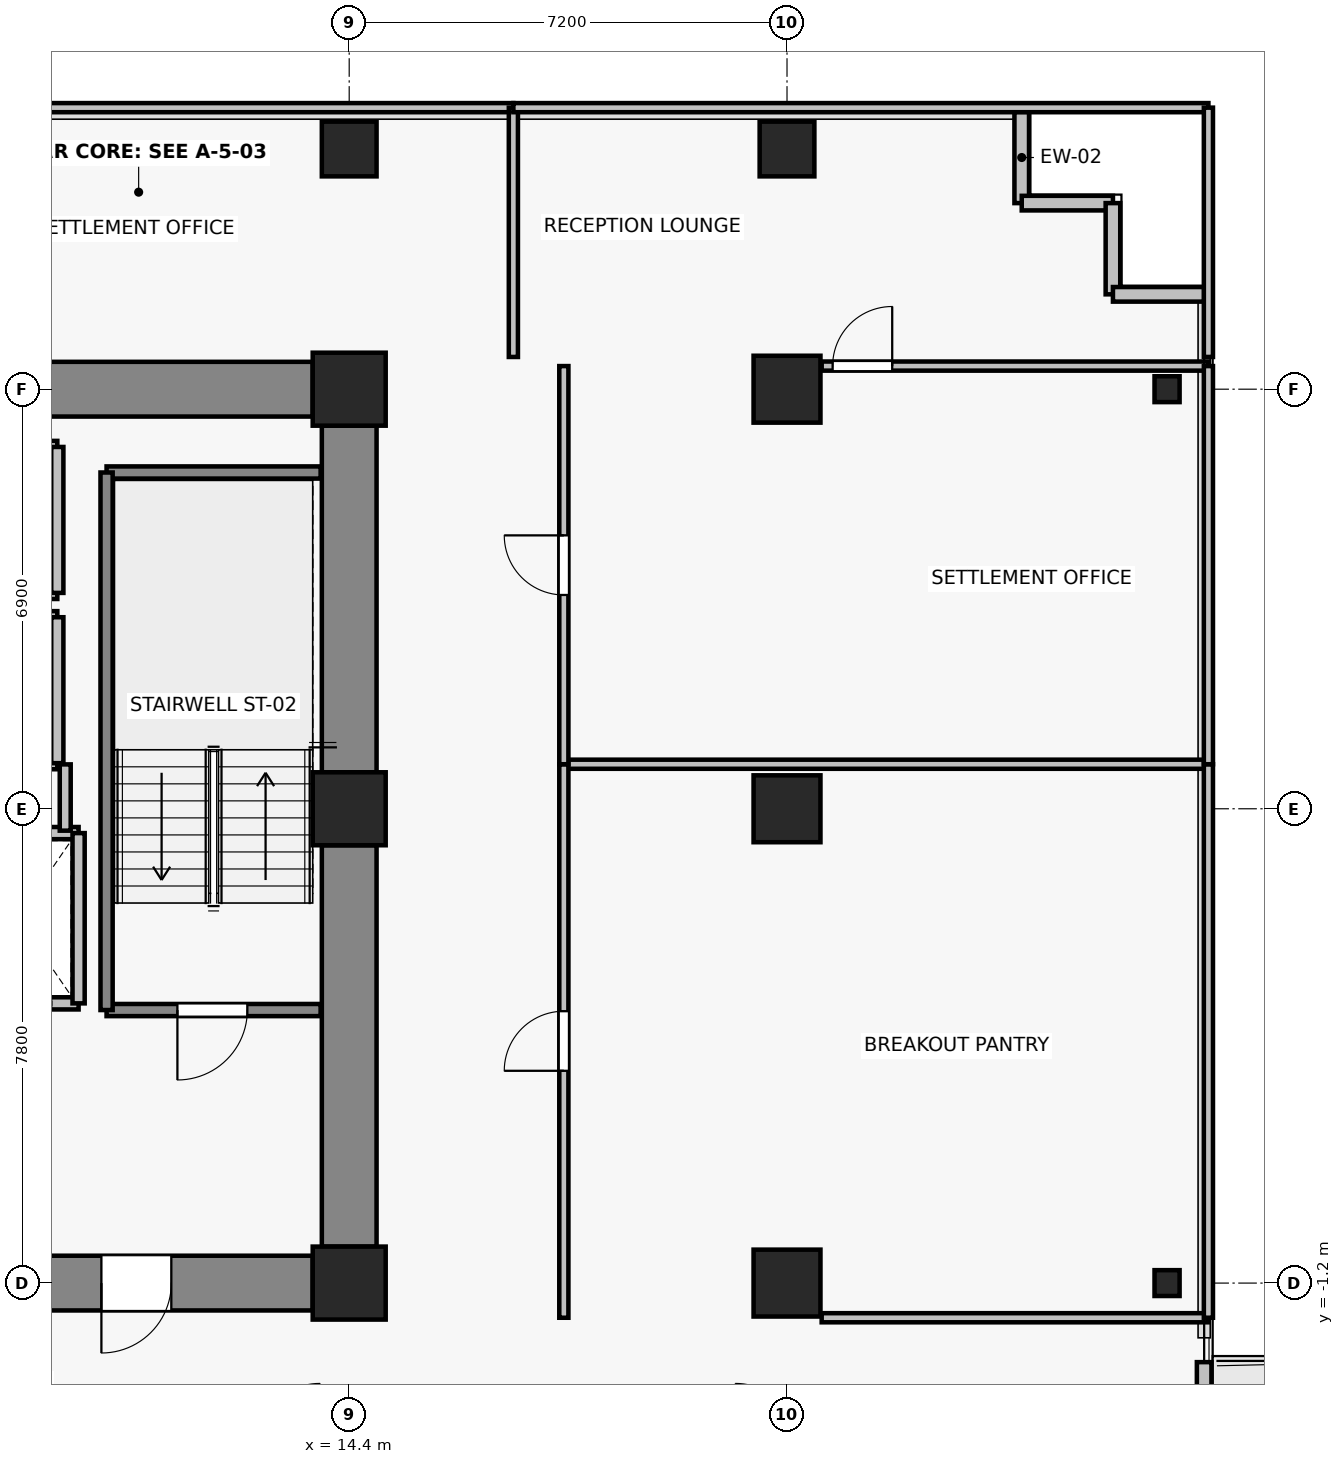
"""IFC4 building model, lengths in metres.
Left out: names, types, materials, properties, quantities, classifications, styles, units other than length and angle.
Written with IfcOpenShell. Run it as: python <this file> out.ifc"""

import sys

from ifc_helpers import new_model, si_unit, direction, frame, frame_2d, origin, origin_2d, place, context, subcontext, project, spatial, rectangle, i_section, extrude, source, transform, mapped, element, fill, save


model = new_model("IFC4")
c1 = context("Model", 3, precision=1e-05, world=origin(), true_north=direction((0.0, 1.0)))
c2 = subcontext(c1, "Body", "Model", "MODEL_VIEW")
j1 = project(units=[si_unit("LENGTHUNIT", "METRE"), si_unit("PLANEANGLEUNIT", "RADIAN")], contexts=[c1])
p1 = place(None, origin())
s1 = spatial("IfcSite", under=j1, at=p1, CompositionType="ELEMENT")
p2 = place(p1, origin())
s2 = spatial("IfcBuilding", under=s1, at=p2, CompositionType="ELEMENT")
p3 = place(p2, frame((0.0, 0.0, 37.3)))
s3 = spatial("IfcBuildingStorey", under=s2, at=p3, CompositionType="ELEMENT", Elevation=37.3)
for number, where, z_axis, x_axis in (
    (1, (14.4, -1.2, 0.0), (0.0, 0.0, 1.0), (1.0, 0.0, 0.0)),
    (2, (14.4, 6.6, 0.0), (0.0, 0.0, 1.0), (1.0, 0.0, 0.0)),
    (3, (14.4, 13.5, 0.0), (0.0, 0.0, 1.0), (1.0, 0.0, 0.0)),
):
    element("IfcColumn", number, at=place(p3, frame(where, z_axis=z_axis, x_axis=x_axis)), inside=s3, PredefinedType="COLUMN", context=c2, shape_type="SweptSolid", body=[
        extrude(rectangle(XDim=1.2, YDim=1.2, at=origin_2d()), origin(), (0.0, 0.0, 1.0), 3.3),
    ])
for number, where, z_axis, x_axis in (
    (4, (21.6, -1.2, 0.0), (0.0, 0.0, 1.0), (1.0, 0.0, 0.0)),
    (5, (21.6, 6.6, 0.0), (0.0, 0.0, 1.0), (1.0, 0.0, 0.0)),
    (6, (21.6, 13.5, 0.0), (0.0, 0.0, 1.0), (1.0, 0.0, 0.0)),
):
    element("IfcColumn", number, at=place(p3, frame(where, z_axis=z_axis, x_axis=x_axis)), inside=s3, PredefinedType="COLUMN", context=c2, shape_type="SweptSolid", body=[
        extrude(rectangle(XDim=1.1, YDim=1.1, at=origin_2d()), origin(), (0.0, 0.0, 1.0), 3.3),
    ])
for number, where, z_axis, x_axis in (
    (7, (14.4, 17.45, 0.0), (0.0, 0.0, 1.0), (1.0, 0.0, 0.0)),
    (8, (21.6, 17.45, 0.0), (0.0, 0.0, 1.0), (1.0, 0.0, 0.0)),
):
    element("IfcColumn", number, at=place(p3, frame(where, z_axis=z_axis, x_axis=x_axis)), inside=s3, PredefinedType="COLUMN", context=c2, shape_type="SweptSolid", body=[
        extrude(rectangle(XDim=0.9, YDim=0.9, at=origin_2d()), origin(), (0.0, 0.0, 1.0), 3.3),
    ])
for number, where, z_axis, x_axis in (
    (9, (27.85, -1.2, 0.0), (0.0, 0.0, 1.0), (1.0, 0.0, 0.0)),
    (10, (27.85, 13.5, 0.0), (0.0, 0.0, 1.0), (1.0, 0.0, 0.0)),
):
    element("IfcColumn", number, at=place(p3, frame(where, z_axis=z_axis, x_axis=x_axis)), inside=s3, PredefinedType="COLUMN", context=c2, shape_type="SweptSolid", body=[
        extrude(i_section(OverallWidth=0.412, OverallDepth=0.425, WebThickness=0.026, FlangeThickness=0.039, FilletRadius=0.015, at=origin_2d()), origin(), (0.0, 0.0, 1.0), 3.3),
    ])
p4 = place(p3, frame((7.8, 13.5, 0.0), z_axis=(0.0, 0.0, 1.0), x_axis=(1.0, 0.0, 0.0)))
e11 = element("IfcWall", 11, at=p4, inside=s3, PredefinedType="SHEAR", context=c2, shape_type="SweptSolid", body=[
    extrude(rectangle(XDim=6.0, YDim=0.9, at=frame_2d((3.0, 0.0))), origin(), (0.0, 0.0, 1.0), 3.075),
])
p5 = place(p3, frame((14.4, -0.6, 0.0), z_axis=(0.0, 0.0, 1.0), x_axis=(0.0, 1.0, 0.0)))
e12 = element("IfcWall", 12, at=p5, inside=s3, PredefinedType="SHEAR", context=c2, shape_type="SweptSolid", body=[
    extrude(rectangle(XDim=6.6, YDim=0.9, at=frame_2d((3.3, 0.0))), origin(), (0.0, 0.0, 1.0), 3.075),
])
p6 = place(p3, frame((14.4, 7.2, 0.0), z_axis=(0.0, 0.0, 1.0), x_axis=(0.0, 1.0, 0.0)))
e13 = element("IfcWall", 13, at=p6, inside=s3, PredefinedType="SHEAR", context=c2, shape_type="SweptSolid", body=[
    extrude(rectangle(XDim=5.7, YDim=0.9, at=frame_2d((2.85, 0.0))), origin(), (0.0, 0.0, 1.0), 3.075),
])
p7 = place(p3, frame((13.8, -1.2, 0.0), z_axis=(0.0, 0.0, 1.0), x_axis=(-1.0, 0.0, 0.0)))
e14 = element("IfcWall", 14, at=p7, inside=s3, PredefinedType="SHEAR", context=c2, shape_type="SweptSolid", body=[
    extrude(rectangle(XDim=6.0, YDim=0.9, at=frame_2d((3.0, 0.0))), origin(), (0.0, 0.0, 1.0), 3.075),
])
p8 = place(p7, frame((2.325, 0.0, 0.0)))
e15 = element("IfcOpeningElement", 15, at=p8, cuts=e14, PredefinedType="OPENING", context=c2, shape_type="SweptSolid", body=[
    extrude(rectangle(XDim=1.15, YDim=2.15, at=frame_2d((0.575, 1.075))), frame((0.0, 0.46, 0.0), z_axis=(0.0, -1.0, 0.0), x_axis=(1.0, 0.0, 0.0)), (0.0, 0.0, 1.0), 0.92),
])
p9 = place(p3, frame((28.46, -2.5, 0.0), z_axis=(0.0, 0.0, 1.0), x_axis=(0.0, -1.0, 0.0)))
e16 = element("IfcWall", 16, at=p9, inside=s3, PredefinedType="SOLIDWALL", context=c2, shape_type="SweptSolid", body=[
    extrude(rectangle(XDim=5.8, YDim=0.24, at=frame_2d((2.9, 0.0))), origin(), (0.0, 0.0, 1.0), 3.075),
])
p10 = place(p9, frame((1.566, 0.0, 0.0)))
e17 = element("IfcOpeningElement", 17, at=p10, cuts=e16, PredefinedType="OPENING", context=c2, shape_type="SweptSolid", body=[
    extrude(rectangle(XDim=1.0, YDim=2.2, at=frame_2d((0.5, 1.1))), frame((0.0, 0.13, 0.0), z_axis=(0.0, -1.0, 0.0), x_axis=(1.0, 0.0, 0.0)), (0.0, 0.0, 1.0), 0.26),
])
p11 = place(p9, frame((2.916, 0.0, 0.85)))
e18 = element("IfcOpeningElement", 18, at=p11, cuts=e16, PredefinedType="OPENING", context=c2, shape_type="SweptSolid", body=[
    extrude(rectangle(XDim=1.5, YDim=1.6, at=frame_2d((0.75, 0.8))), frame((0.0, 0.13, 0.0), z_axis=(0.0, -1.0, 0.0), x_axis=(1.0, 0.0, 0.0)), (0.0, 0.0, 1.0), 0.26),
])
for number, where, z_axis, x_axis in (
    (19, (25.46, 16.56, 0.0), (0.0, 0.0, 1.0), (0.0, 1.0, 0.0)),
    (20, (26.96, 16.56, 0.0), (0.0, 0.0, 1.0), (-1.0, 0.0, 0.0)),
    (21, (26.96, 15.06, 0.0), (0.0, 0.0, 1.0), (0.0, 1.0, 0.0)),
    (22, (28.46, 15.06, 0.0), (0.0, 0.0, 1.0), (-1.0, 0.0, 0.0)),
):
    element("IfcWall", number, at=place(p3, frame(where, z_axis=z_axis, x_axis=x_axis)), inside=s3, PredefinedType="SOLIDWALL", context=c2, shape_type="SweptSolid", body=[
        extrude(rectangle(XDim=1.5, YDim=0.24, at=frame_2d((0.75, 0.0))), origin(), (0.0, 0.0, 1.0), 3.075),
    ])
p12 = place(p3, frame((9.95, 3.4, 0.0), z_axis=(0.0, 0.0, 1.0), x_axis=(-1.0, 0.0, 0.0)))
e23 = element("IfcWall", 23, at=p12, inside=s3, PredefinedType="SOLIDWALL", context=c2, shape_type="SweptSolid", body=[
    extrude(rectangle(XDim=2.0, YDim=0.2, at=frame_2d((1.0, 0.0))), origin(), (0.0, 0.0, 1.0), 3.075),
])
p13 = place(p12, frame((0.45, 0.0, 0.0)))
e24 = element("IfcOpeningElement", 24, at=p13, cuts=e23, PredefinedType="OPENING", context=c2, shape_type="SweptSolid", body=[
    extrude(rectangle(XDim=1.1, YDim=2.2, at=frame_2d((0.55, 1.1))), frame((0.0, 0.11, 0.0), z_axis=(0.0, -1.0, 0.0), x_axis=(1.0, 0.0, 0.0)), (0.0, 0.0, 1.0), 0.22),
])
p14 = place(p3, frame((7.95, 6.2, 0.0), z_axis=(0.0, 0.0, 1.0), x_axis=(1.0, 0.0, 0.0)))
e25 = element("IfcWall", 25, at=p14, inside=s3, PredefinedType="SOLIDWALL", context=c2, shape_type="SweptSolid", body=[
    extrude(rectangle(XDim=2.0, YDim=0.2, at=frame_2d((1.0, 0.0))), origin(), (0.0, 0.0, 1.0), 3.075),
])
p15 = place(p3, frame((9.95, 6.2, 0.0), z_axis=(0.0, 0.0, 1.0), x_axis=(0.0, -1.0, 0.0)))
e26 = element("IfcWall", 26, at=p15, inside=s3, PredefinedType="SOLIDWALL", context=c2, shape_type="SweptSolid", body=[
    extrude(rectangle(XDim=2.8, YDim=0.2, at=frame_2d((1.4, 0.0))), origin(), (0.0, 0.0, 1.0), 3.075),
])
for number, where, z_axis, x_axis in (
    (27, (9.6, 7.35, 0.0), (0.0, 0.0, 1.0), (-1.0, 0.0, 0.0)),
    (28, (7.4, 9.75, 0.0), (0.0, 0.0, 1.0), (1.0, 0.0, 0.0)),
):
    element("IfcWall", number, at=place(p3, frame(where, z_axis=z_axis, x_axis=x_axis)), inside=s3, PredefinedType="SOLIDWALL", context=c2, shape_type="SweptSolid", body=[
        extrude(rectangle(XDim=2.2, YDim=0.2, at=frame_2d((1.1, 0.0))), origin(), (0.0, 0.0, 1.0), 2.465),
    ])
p16 = place(p3, frame((9.6, 9.75, 0.0), z_axis=(0.0, 0.0, 1.0), x_axis=(0.0, -1.0, 0.0)))
e29 = element("IfcWall", 29, at=p16, inside=s3, PredefinedType="SOLIDWALL", context=c2, shape_type="SweptSolid", body=[
    extrude(rectangle(XDim=2.4, YDim=0.2, at=frame_2d((1.2, 0.0))), origin(), (0.0, 0.0, 1.0), 3.075),
])
for number, where, z_axis, x_axis in (
    (30, (9.6, 10.15, 0.0), (0.0, 0.0, 1.0), (-1.0, 0.0, 0.0)),
    (31, (7.4, 12.55, 0.0), (0.0, 0.0, 1.0), (1.0, 0.0, 0.0)),
):
    element("IfcWall", number, at=place(p3, frame(where, z_axis=z_axis, x_axis=x_axis)), inside=s3, PredefinedType="SOLIDWALL", context=c2, shape_type="SweptSolid", body=[
        extrude(rectangle(XDim=2.2, YDim=0.2, at=frame_2d((1.1, 0.0))), origin(), (0.0, 0.0, 1.0), 2.465),
    ])
p17 = place(p3, frame((9.6, 12.55, 0.0), z_axis=(0.0, 0.0, 1.0), x_axis=(0.0, -1.0, 0.0)))
e32 = element("IfcWall", 32, at=p17, inside=s3, PredefinedType="SOLIDWALL", context=c2, shape_type="SweptSolid", body=[
    extrude(rectangle(XDim=2.4, YDim=0.2, at=frame_2d((1.2, 0.0))), origin(), (0.0, 0.0, 1.0), 3.075),
])
p18 = place(p3, frame((13.93, 3.29, 0.0), z_axis=(0.0, 0.0, 1.0), x_axis=(-1.0, 0.0, 0.0)))
e33 = element("IfcWall", 33, at=p18, inside=s3, PredefinedType="SOLIDWALL", context=c2, shape_type="SweptSolid", body=[
    extrude(rectangle(XDim=3.52, YDim=0.2, at=frame_2d((1.76, 0.0))), origin(), (0.0, 0.0, 1.0), 3.075),
])
p19 = place(p18, frame((1.205, 0.0, 0.0)))
e34 = element("IfcOpeningElement", 34, at=p19, cuts=e33, PredefinedType="OPENING", context=c2, shape_type="SweptSolid", body=[
    extrude(rectangle(XDim=1.15, YDim=2.15, at=frame_2d((0.575, 1.075))), frame((0.0, 0.11, 0.0), z_axis=(0.0, -1.0, 0.0), x_axis=(1.0, 0.0, 0.0)), (0.0, 0.0, 1.0), 0.22),
])
p20 = place(p3, frame((10.41, 12.13, 0.0), z_axis=(0.0, 0.0, 1.0), x_axis=(1.0, 0.0, 0.0)))
e35 = element("IfcWall", 35, at=p20, inside=s3, PredefinedType="SOLIDWALL", context=c2, shape_type="SweptSolid", body=[
    extrude(rectangle(XDim=3.52, YDim=0.2, at=frame_2d((1.76, 0.0))), origin(), (0.0, 0.0, 1.0), 3.075),
])
p21 = place(p3, frame((10.41, 3.29, 0.0), z_axis=(0.0, 0.0, 1.0), x_axis=(0.0, 1.0, 0.0)))
e36 = element("IfcWall", 36, at=p21, inside=s3, PredefinedType="SOLIDWALL", context=c2, shape_type="SweptSolid", body=[
    extrude(rectangle(XDim=8.84, YDim=0.2, at=frame_2d((4.42, 0.0))), origin(), (0.0, 0.0, 1.0), 3.075),
])
p22 = place(p3, frame((9.73, 7.33, 0.0), z_axis=(0.0, 0.0, 1.0), x_axis=(0.0, -1.0, 0.0)))
e37 = element("IfcWall", 37, at=p22, inside=s3, PredefinedType="PARTITIONING", context=c2, shape_type="SweptSolid", body=[
    extrude(rectangle(XDim=1.09, YDim=0.18, at=frame_2d((0.545, 0.0))), origin(), (0.0, 0.0, 1.0), 3.075),
])
p23 = place(p3, frame((28.53, -1.77, 0.0), z_axis=(0.0, 0.0, 1.0), x_axis=(-1.0, 0.0, 0.0)))
e38 = element("IfcWall", 38, at=p23, inside=s3, PredefinedType="PARTITIONING", context=c2, shape_type="SweptSolid", body=[
    extrude(rectangle(XDim=6.36, YDim=0.15, at=frame_2d((3.18, 0.0))), origin(), (0.0, 0.0, 1.0), 2.465),
])
p24 = place(p3, frame((17.93, 7.333, 0.0), z_axis=(0.0, 0.0, 1.0), x_axis=(1.0, 0.0, 0.0)))
e39 = element("IfcWall", 39, at=p24, inside=s3, PredefinedType="PARTITIONING", context=c2, shape_type="SweptSolid", body=[
    extrude(rectangle(XDim=10.6, YDim=0.15, at=frame_2d((5.3, 0.0))), origin(), (0.0, 0.0, 1.0), 2.465),
])
p25 = place(p3, frame((17.93, -1.77, 0.0), z_axis=(0.0, 0.0, 1.0), x_axis=(0.0, 1.0, 0.0)))
e40 = element("IfcWall", 40, at=p25, inside=s3, PredefinedType="PARTITIONING", context=c2, shape_type="SweptSolid", body=[
    extrude(rectangle(XDim=9.103, YDim=0.15, at=frame_2d((4.551, 0.0))), origin(), (0.0, 0.0, 1.0), 2.465),
])
p26 = place(p25, frame((4.061, 0.0, 0.0)))
e41 = element("IfcOpeningElement", 41, at=p26, cuts=e40, PredefinedType="OPENING", context=c2, shape_type="SweptSolid", body=[
    extrude(rectangle(XDim=0.98, YDim=2.15, at=frame_2d((0.49, 1.075))), frame((0.0, 0.085, 0.0), z_axis=(0.0, -1.0, 0.0), x_axis=(1.0, 0.0, 0.0)), (0.0, 0.0, 1.0), 0.17),
])
p27 = place(p3, frame((28.53, 7.333, 0.0), z_axis=(0.0, 0.0, 1.0), x_axis=(0.0, -1.0, 0.0)))
e42 = element("IfcWall", 42, at=p27, inside=s3, PredefinedType="PARTITIONING", context=c2, shape_type="SweptSolid", body=[
    extrude(rectangle(XDim=9.103, YDim=0.15, at=frame_2d((4.551, 0.0))), origin(), (0.0, 0.0, 1.0), 3.075),
])
p28 = place(p3, frame((22.17, 13.88, 0.0), z_axis=(0.0, 0.0, 1.0), x_axis=(1.0, 0.0, 0.0)))
e43 = element("IfcWall", 43, at=p28, inside=s3, PredefinedType="PARTITIONING", context=c2, shape_type="SweptSolid", body=[
    extrude(rectangle(XDim=6.36, YDim=0.15, at=frame_2d((3.18, 0.0))), origin(), (0.0, 0.0, 1.0), 3.075),
])
p29 = place(p28, frame((0.18, 0.0, 0.0)))
e44 = element("IfcOpeningElement", 44, at=p29, cuts=e43, PredefinedType="OPENING", context=c2, shape_type="SweptSolid", body=[
    extrude(rectangle(XDim=0.98, YDim=2.15, at=frame_2d((0.49, 1.075))), frame((0.0, 0.085, 0.0), z_axis=(0.0, -1.0, 0.0), x_axis=(1.0, 0.0, 0.0)), (0.0, 0.0, 1.0), 0.17),
])
p30 = place(p3, frame((17.93, 7.333, 0.0), z_axis=(0.0, 0.0, 1.0), x_axis=(0.0, 1.0, 0.0)))
e45 = element("IfcWall", 45, at=p30, inside=s3, PredefinedType="PARTITIONING", context=c2, shape_type="SweptSolid", body=[
    extrude(rectangle(XDim=6.547, YDim=0.15, at=frame_2d((3.274, 0.0))), origin(), (0.0, 0.0, 1.0), 2.465),
])
p31 = place(p30, frame((2.783, 0.0, 0.0)))
e46 = element("IfcOpeningElement", 46, at=p31, cuts=e45, PredefinedType="OPENING", context=c2, shape_type="SweptSolid", body=[
    extrude(rectangle(XDim=0.98, YDim=2.15, at=frame_2d((0.49, 1.075))), frame((0.0, 0.085, 0.0), z_axis=(0.0, -1.0, 0.0), x_axis=(1.0, 0.0, 0.0)), (0.0, 0.0, 1.0), 0.17),
])
p32 = place(p3, frame((28.53, 13.88, 0.0), z_axis=(0.0, 0.0, 1.0), x_axis=(0.0, -1.0, 0.0)))
e47 = element("IfcWall", 47, at=p32, inside=s3, PredefinedType="PARTITIONING", context=c2, shape_type="SweptSolid", body=[
    extrude(rectangle(XDim=6.547, YDim=0.15, at=frame_2d((3.274, 0.0))), origin(), (0.0, 0.0, 1.0), 3.075),
])
p33 = place(p3, frame((-32.53, 18.13, 0.0), z_axis=(0.0, 0.0, 1.0), x_axis=(1.0, 0.0, 0.0)))
e48 = element("IfcWall", 48, at=p33, inside=s3, PredefinedType="PARTITIONING", context=c2, shape_type="SweptSolid", body=[
    extrude(rectangle(XDim=49.63, YDim=0.15, at=frame_2d((24.815, 0.0))), origin(), (0.0, 0.0, 1.0), 3.075),
])
p34 = place(p3, frame((17.1, 18.13, 0.0), z_axis=(0.0, 0.0, 1.0), x_axis=(0.0, -1.0, 0.0)))
e49 = element("IfcWall", 49, at=p34, inside=s3, PredefinedType="PARTITIONING", context=c2, shape_type="SweptSolid", body=[
    extrude(rectangle(XDim=4.1, YDim=0.15, at=frame_2d((2.05, 0.0))), origin(), (0.0, 0.0, 1.0), 2.465),
])
p35 = place(p3, frame((17.1, 18.13, 0.0), z_axis=(0.0, 0.0, 1.0), x_axis=(1.0, 0.0, 0.0)))
e50 = element("IfcWall", 50, at=p35, inside=s3, PredefinedType="PARTITIONING", context=c2, shape_type="SweptSolid", body=[
    extrude(rectangle(XDim=11.43, YDim=0.15, at=frame_2d((5.715, 0.0))), origin(), (0.0, 0.0, 1.0), 3.075),
])
p36 = place(p3, frame((28.53, 18.13, 0.0), z_axis=(0.0, 0.0, 1.0), x_axis=(0.0, -1.0, 0.0)))
e51 = element("IfcWall", 51, at=p36, inside=s3, PredefinedType="PARTITIONING", context=c2, shape_type="SweptSolid", body=[
    extrude(rectangle(XDim=4.1, YDim=0.15, at=frame_2d((2.05, 0.0))), origin(), (0.0, 0.0, 1.0), 3.075),
])
m1 = source(origin(), c2, "Body", "SweptSolid", [
    extrude(rectangle(XDim=1.15, YDim=2.15, at=frame_2d((0.575, 1.075))), frame((0.0, 0.025, 0.0), z_axis=(0.0, -1.0, 0.0), x_axis=(1.0, 0.0, 0.0)), (0.0, 0.0, 1.0), 0.05),
])
p37 = place(p19, origin())
e52 = element("IfcDoor", 52, at=p37, inside=s3, OperationType="SINGLE_SWING_RIGHT", PredefinedType="DOOR", context=c2, shape_type="MappedRepresentation", body=[
    mapped(m1, transform((0.0, 0.0, 0.0), x_axis=(1.0, 0.0, 0.0), y_axis=(0.0, 1.0, 0.0), z_axis=(0.0, 0.0, 1.0), scale=1.0)),
])
fill(e34, e52)
p38 = place(p8, origin())
e53 = element("IfcDoor", 53, at=p38, inside=s3, OperationType="SINGLE_SWING_RIGHT", PredefinedType="DOOR", context=c2, shape_type="MappedRepresentation", body=[
    mapped(m1, transform((0.0, 0.0, 0.0), x_axis=(1.0, 0.0, 0.0), y_axis=(0.0, 1.0, 0.0), z_axis=(0.0, 0.0, 1.0), scale=1.0)),
])
fill(e15, e53)
m2 = source(origin(), c2, "Body", "SweptSolid", [
    extrude(rectangle(XDim=0.98, YDim=2.15, at=frame_2d((0.49, 1.075))), frame((0.0, 0.025, 0.0), z_axis=(0.0, -1.0, 0.0), x_axis=(1.0, 0.0, 0.0)), (0.0, 0.0, 1.0), 0.05),
])
p39 = place(p26, origin())
e54 = element("IfcDoor", 54, at=p39, inside=s3, OperationType="SINGLE_SWING_LEFT", PredefinedType="DOOR", context=c2, shape_type="MappedRepresentation", body=[
    mapped(m2, transform((0.0, 0.0, 0.0), x_axis=(1.0, 0.0, 0.0), y_axis=(0.0, 1.0, 0.0), z_axis=(0.0, 0.0, 1.0), scale=1.0)),
])
fill(e41, e54)
p40 = place(p31, origin())
e55 = element("IfcDoor", 55, at=p40, inside=s3, OperationType="SINGLE_SWING_RIGHT", PredefinedType="DOOR", context=c2, shape_type="MappedRepresentation", body=[
    mapped(m2, transform((0.0, 0.0, 0.0), x_axis=(1.0, 0.0, 0.0), y_axis=(0.0, 1.0, 0.0), z_axis=(0.0, 0.0, 1.0), scale=1.0)),
])
fill(e46, e55)
p41 = place(p29, origin())
e56 = element("IfcDoor", 56, at=p41, inside=s3, OperationType="SINGLE_SWING_RIGHT", PredefinedType="DOOR", context=c2, shape_type="MappedRepresentation", body=[
    mapped(m2, transform((0.0, 0.0, 0.0), x_axis=(1.0, 0.0, 0.0), y_axis=(0.0, 1.0, 0.0), z_axis=(0.0, 0.0, 1.0), scale=1.0)),
])
fill(e44, e56)
save(model, sys.argv[1])
